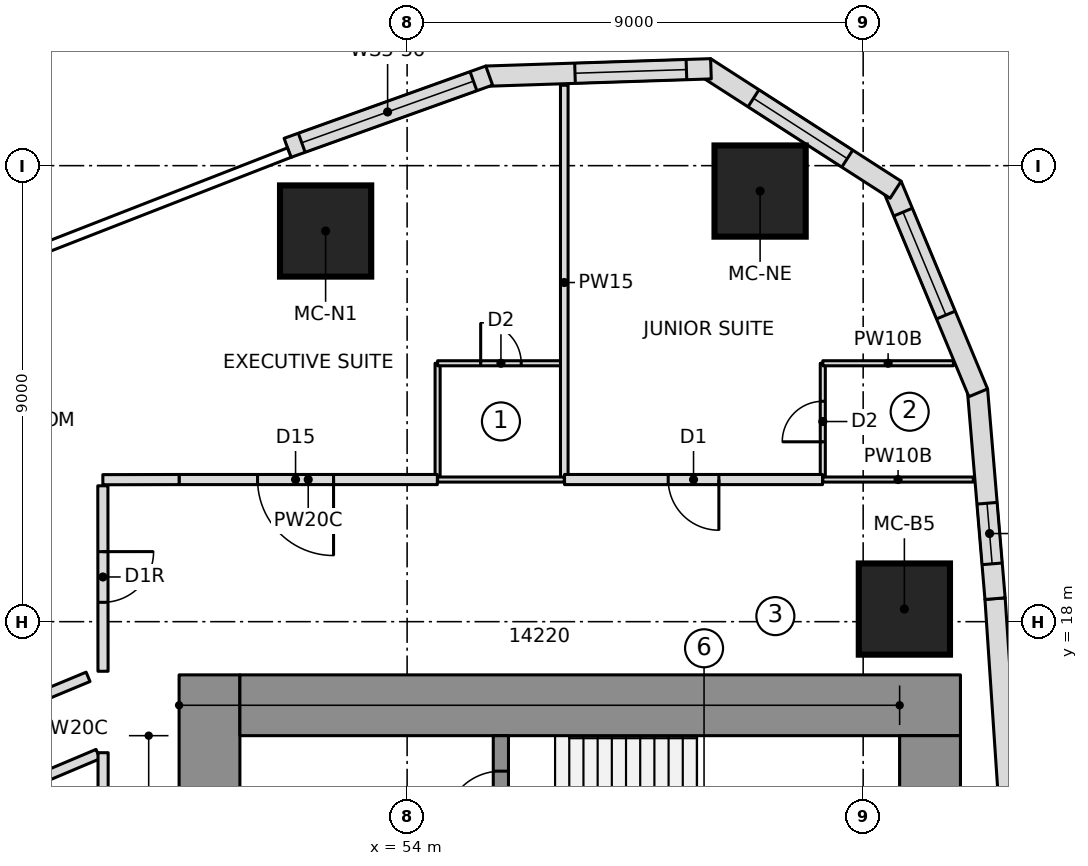
"""IFC4 building model, lengths in metres.
Left out: names, types, materials, properties, quantities, classifications, styles, units other than length and angle.
Written with IfcOpenShell. Run it as: python <this file> out.ifc"""

import sys

from ifc_helpers import new_model, si_unit, direction, frame, frame_2d, origin, origin_2d, place, context, subcontext, project, spatial, polyline, rectangle, outline, extrude, element, fill, save


model = new_model("IFC4")
c1 = context("Model", 3, precision=1e-05, world=origin(), true_north=direction((0.0, 1.0)))
c2 = subcontext(c1, "Body", "Model", "MODEL_VIEW")
j1 = project(units=[si_unit("LENGTHUNIT", "METRE"), si_unit("PLANEANGLEUNIT", "RADIAN")], contexts=[c1])
p1 = place(None, origin())
s1 = spatial("IfcSite", under=j1, at=p1, CompositionType="ELEMENT")
p2 = place(p1, origin())
s2 = spatial("IfcBuilding", under=s1, at=p2, CompositionType="ELEMENT")
p3 = place(p2, frame((0.0, 0.0, 68.0)))
s3 = spatial("IfcBuildingStorey", under=s2, at=p3, CompositionType="ELEMENT", Elevation=68.0)
p4 = place(p3, frame((50.1, 6.65, 0.0), z_axis=(0.0, 0.0, 1.0), x_axis=(0.0, 1.0, 0.0)))
e1 = element("IfcWall", 1, at=p4, inside=s3, PredefinedType="SHEAR", context=c2, shape_type="SweptSolid", body=[
    extrude(rectangle(XDim=10.3, YDim=1.2, at=frame_2d((5.15, 0.0))), origin(), (0.0, 0.0, 1.0), 3.55),
])
p5 = place(p4, frame((6.5, 0.0, 0.0)))
e2 = element("IfcOpeningElement", 2, at=p5, cuts=e1, PredefinedType="OPENING", context=c2, shape_type="SweptSolid", body=[
    extrude(rectangle(XDim=1.1, YDim=2.1, at=frame_2d((0.55, 1.05))), frame((0.0, 0.61, 0.0), z_axis=(0.0, -1.0, 0.0), x_axis=(1.0, 0.0, 0.0)), (0.0, 0.0, 1.0), 1.22),
])
p6 = place(p3, frame((50.7, 16.35, 0.0), z_axis=(0.0, 0.0, 1.0), x_axis=(1.0, 0.0, 0.0)))
e3 = element("IfcWall", 3, at=p6, inside=s3, PredefinedType="SHEAR", context=c2, shape_type="SweptSolid", body=[
    extrude(rectangle(XDim=14.22, YDim=1.2, at=frame_2d((7.11, 0.0))), origin(), (0.0, 0.0, 1.0), 3.55),
])
p7 = place(p3, frame((64.32, 9.95, 0.0), z_axis=(0.0, 0.0, 1.0), x_axis=(0.0, 1.0, 0.0)))
e4 = element("IfcWall", 4, at=p7, inside=s3, PredefinedType="SHEAR", context=c2, shape_type="SweptSolid", body=[
    extrude(rectangle(XDim=5.8, YDim=1.2, at=frame_2d((2.9, 0.0))), origin(), (0.0, 0.0, 1.0), 3.55),
])
p8 = place(p3, frame((55.85, 10.35, 0.0), z_axis=(0.0, 0.0, 1.0), x_axis=(0.0, 1.0, 0.0)))
e5 = element("IfcWall", 5, at=p8, inside=s3, PredefinedType="SHEAR", context=c2, shape_type="SweptSolid", body=[
    extrude(rectangle(XDim=5.4, YDim=0.3, at=frame_2d((2.7, 0.0))), origin(), (0.0, 0.0, 1.0), 3.55),
])
p9 = place(p8, frame((1.43, 0.0, 0.0)))
e6 = element("IfcOpeningElement", 6, at=p9, cuts=e5, PredefinedType="OPENING", context=c2, shape_type="SweptSolid", body=[
    extrude(rectangle(XDim=1.1, YDim=2.1, at=frame_2d((0.55, 1.05))), frame((0.0, 0.16, 0.0), z_axis=(0.0, -1.0, 0.0), x_axis=(1.0, 0.0, 0.0)), (0.0, 0.0, 1.0), 0.32),
])
p10 = place(p8, frame((3.6, 0.0, 0.0)))
e7 = element("IfcOpeningElement", 7, at=p10, cuts=e5, PredefinedType="OPENING", context=c2, shape_type="SweptSolid", body=[
    extrude(rectangle(XDim=1.1, YDim=2.1, at=frame_2d((0.55, 1.05))), frame((0.0, 0.16, 0.0), z_axis=(0.0, -1.0, 0.0), x_axis=(1.0, 0.0, 0.0)), (0.0, 0.0, 1.0), 0.32),
])
for number, where, z_axis, x_axis in (
    (8, (63.813, 18.249, 0.0), (0.0, 0.0, 1.0), (1.0, 0.0, 0.0)),
    (9, (60.966, 26.499, 0.0), (0.0, 0.0, 1.0), (1.0, 0.0, 0.0)),
    (10, (52.392, 25.71, 0.0), (0.0, 0.0, 1.0), (1.0, 0.0, 0.0)),
):
    element("IfcColumn", number, at=place(p3, frame(where, z_axis=z_axis, x_axis=x_axis)), inside=s3, PredefinedType="COLUMN", context=c2, shape_type="SweptSolid", body=[
        extrude(rectangle(XDim=1.8, YDim=1.8, at=origin_2d()), origin(), (0.0, 0.0, 1.0), 3.55),
    ])
p11 = place(p3, frame((65.878, 14.36, 0.0), z_axis=(0.0, 0.0, 1.0), x_axis=(-0.067087430225, 0.997747100575, 0.0)))
e11 = element("IfcWall", 11, at=p11, inside=s3, PredefinedType="NOTDEFINED", context=c2, shape_type="SweptSolid", body=[
    extrude(outline(polyline([(-0.002, -0.2), (4.107, -0.2), (4.103, 0.2), (0.002, 0.2), (-0.002, -0.2)])), origin(), (0.0, 0.0, 1.0), 3.25),
])
p12 = place(p3, frame((65.603, 18.455, 0.0), z_axis=(0.0, 0.0, 1.0), x_axis=(-0.083793550906, 0.996483136248, 0.0)))
e12 = element("IfcWall", 12, at=p12, inside=s3, PredefinedType="NOTDEFINED", context=c2, shape_type="SweptSolid", body=[
    extrude(outline(polyline([(-0.002, -0.2), (4.136, -0.2), (4.074, 0.2), (0.002, 0.2), (-0.002, -0.2)])), origin(), (0.0, 0.0, 1.0), 3.25),
])
p13 = place(p12, frame((0.688, 0.0, 0.9)))
e13 = element("IfcOpeningElement", 13, at=p13, cuts=e12, PredefinedType="OPENING", context=c2, shape_type="SweptSolid", body=[
    extrude(rectangle(XDim=1.2, YDim=1.8, at=frame_2d((0.6, 0.9))), frame((0.0, 0.21, 0.0), z_axis=(0.0, -1.0, 0.0), x_axis=(1.0, 0.0, 0.0)), (0.0, 0.0, 1.0), 0.42),
])
p14 = place(p3, frame((65.259, 22.546, 0.0), z_axis=(0.0, 0.0, 1.0), x_axis=(-0.384372042685, 0.923178277908, 0.0)))
e14 = element("IfcWall", 14, at=p14, inside=s3, PredefinedType="NOTDEFINED", context=c2, shape_type="SweptSolid", body=[
    extrude(outline(polyline([(-0.031, -0.2), (4.408, -0.2), (4.283, 0.2), (0.031, 0.2), (-0.031, -0.2)])), origin(), (0.0, 0.0, 1.0), 3.25),
])
p15 = place(p14, frame((1.631, 0.0, 0.6)))
e15 = element("IfcOpeningElement", 15, at=p15, cuts=e14, PredefinedType="OPENING", context=c2, shape_type="SweptSolid", body=[
    extrude(outline(polyline([(0.0, 1.35), (0.084, 1.771), (0.322, 2.128), (0.679, 2.366), (1.1, 2.45), (1.521, 2.366), (1.878, 2.128), (2.116, 1.771), (2.2, 1.35), (2.2, 1.1), (2.116, 0.679), (1.878, 0.322), (1.521, 0.084), (1.1, 0.0), (0.679, 0.084), (0.322, 0.322), (0.084, 0.679), (0.0, 1.1), (0.0, 1.35)])), frame((0.0, 0.21, 0.0), z_axis=(0.0, -1.0, 0.0), x_axis=(1.0, 0.0, 0.0)), (0.0, 0.0, 1.0), 0.42),
])
p16 = place(p3, frame((63.588, 26.558, 0.0), z_axis=(0.0, 0.0, 1.0), x_axis=(-0.840937468718, 0.541132307025, 0.0)))
e16 = element("IfcWall", 16, at=p16, inside=s3, PredefinedType="NOTDEFINED", context=c2, shape_type="SweptSolid", body=[
    extrude(outline(polyline([(-0.062, -0.2), (4.409, -0.2), (4.284, 0.2), (0.062, 0.2), (-0.062, -0.2)])), origin(), (0.0, 0.0, 1.0), 3.25),
])
p17 = place(p16, frame((1.073, 0.0, 0.6)))
e17 = element("IfcOpeningElement", 17, at=p17, cuts=e16, PredefinedType="OPENING", context=c2, shape_type="SweptSolid", body=[
    extrude(outline(polyline([(0.0, 1.35), (0.084, 1.771), (0.322, 2.128), (0.679, 2.366), (1.1, 2.45), (1.521, 2.366), (1.878, 2.128), (2.116, 1.771), (2.2, 1.35), (2.2, 1.1), (2.116, 0.679), (1.878, 0.322), (1.521, 0.084), (1.1, 0.0), (0.679, 0.084), (0.322, 0.322), (0.084, 0.679), (0.0, 1.1), (0.0, 1.35)])), frame((0.0, 0.21, 0.0), z_axis=(0.0, -1.0, 0.0), x_axis=(1.0, 0.0, 0.0)), (0.0, 0.0, 1.0), 0.42),
])
p18 = place(p3, frame((59.934, 28.91, 0.0), z_axis=(0.0, 0.0, 1.0), x_axis=(-0.999463576228, -0.032749958686, 0.0)))
e18 = element("IfcWall", 18, at=p18, inside=s3, PredefinedType="NOTDEFINED", context=c2, shape_type="SweptSolid", body=[
    extrude(outline(polyline([(-0.062, -0.2), (4.378, -0.2), (4.315, 0.2), (0.062, 0.2), (-0.062, -0.2)])), origin(), (0.0, 0.0, 1.0), 3.25),
])
p19 = place(p18, frame((0.422, 0.0, 0.6)))
e19 = element("IfcOpeningElement", 19, at=p19, cuts=e18, PredefinedType="OPENING", context=c2, shape_type="SweptSolid", body=[
    extrude(outline(polyline([(0.0, 1.35), (0.084, 1.771), (0.322, 2.128), (0.679, 2.366), (1.1, 2.45), (1.521, 2.366), (1.878, 2.128), (2.116, 1.771), (2.2, 1.35), (2.2, 1.1), (2.116, 0.679), (1.878, 0.322), (1.521, 0.084), (1.1, 0.0), (0.679, 0.084), (0.322, 0.322), (0.084, 0.679), (0.0, 1.1), (0.0, 1.35)])), frame((0.0, 0.21, 0.0), z_axis=(0.0, -1.0, 0.0), x_axis=(1.0, 0.0, 0.0)), (0.0, 0.0, 1.0), 0.42),
])
p20 = place(p3, frame((55.59, 28.768, 0.0), z_axis=(0.0, 0.0, 1.0), x_axis=(-0.941339752885, -0.337460323057, 0.0)))
e20 = element("IfcWall", 20, at=p20, inside=s3, PredefinedType="NOTDEFINED", context=c2, shape_type="SweptSolid", body=[
    extrude(outline(polyline([(-0.031, -0.2), (4.196, -0.2), (4.196, 0.2), (0.031, 0.2), (-0.031, -0.2)])), origin(), (0.0, 0.0, 1.0), 3.25),
])
p21 = place(p20, frame((0.298, 0.0, 0.9)))
e21 = element("IfcOpeningElement", 21, at=p21, cuts=e20, PredefinedType="OPENING", context=c2, shape_type="SweptSolid", body=[
    extrude(rectangle(XDim=3.6, YDim=1.8, at=frame_2d((1.8, 0.9))), frame((0.0, 0.21, 0.0), z_axis=(0.0, -1.0, 0.0), x_axis=(1.0, 0.0, 0.0)), (0.0, 0.0, 1.0), 0.42),
])
p22 = place(p3, frame((54.602, 20.8, 0.0), z_axis=(0.0, 0.0, 1.0), x_axis=(0.0, 1.0, 0.0)))
e22 = element("IfcWall", 22, at=p22, inside=s3, PredefinedType="PARTITIONING", context=c2, shape_type="SweptSolid", body=[
    extrude(rectangle(XDim=2.3, YDim=0.1, at=frame_2d((1.15, 0.0))), origin(), (0.0, 0.0, 1.0), 3.25),
])
p23 = place(p3, frame((54.602, 23.1, 0.0), z_axis=(0.0, 0.0, 1.0), x_axis=(1.0, 0.0, 0.0)))
e23 = element("IfcWall", 23, at=p23, inside=s3, PredefinedType="PARTITIONING", context=c2, shape_type="SweptSolid", body=[
    extrude(rectangle(XDim=2.5, YDim=0.1, at=frame_2d((1.25, 0.0))), origin(), (0.0, 0.0, 1.0), 3.25),
])
p24 = place(p23, frame((0.85, 0.0, 0.0)))
e24 = element("IfcOpeningElement", 24, at=p24, cuts=e23, PredefinedType="OPENING", context=c2, shape_type="SweptSolid", body=[
    extrude(rectangle(XDim=0.8, YDim=2.1, at=frame_2d((0.4, 1.05))), frame((0.0, 0.06, 0.0), z_axis=(0.0, -1.0, 0.0), x_axis=(1.0, 0.0, 0.0)), (0.0, 0.0, 1.0), 0.12),
])
p25 = place(p3, frame((62.203, 20.8, 0.0), z_axis=(0.0, 0.0, 1.0), x_axis=(0.0, 1.0, 0.0)))
e25 = element("IfcWall", 25, at=p25, inside=s3, PredefinedType="PARTITIONING", context=c2, shape_type="SweptSolid", body=[
    extrude(rectangle(XDim=2.3, YDim=0.1, at=frame_2d((1.15, 0.0))), origin(), (0.0, 0.0, 1.0), 3.25),
])
p26 = place(p25, frame((0.75, 0.0, 0.0)))
e26 = element("IfcOpeningElement", 26, at=p26, cuts=e25, PredefinedType="OPENING", context=c2, shape_type="SweptSolid", body=[
    extrude(rectangle(XDim=0.8, YDim=2.1, at=frame_2d((0.4, 1.05))), frame((0.0, 0.06, 0.0), z_axis=(0.0, -1.0, 0.0), x_axis=(1.0, 0.0, 0.0)), (0.0, 0.0, 1.0), 0.12),
])
p27 = place(p3, frame((62.203, 23.1, 0.0), z_axis=(0.0, 0.0, 1.0), x_axis=(1.0, 0.0, 0.0)))
e27 = element("IfcWall", 27, at=p27, inside=s3, PredefinedType="PARTITIONING", context=c2, shape_type="SweptSolid", body=[
    extrude(rectangle(XDim=2.578, YDim=0.1, at=frame_2d((1.289, 0.0))), origin(), (0.0, 0.0, 1.0), 3.25),
])
p28 = place(p3, frame((57.102, 20.8, 0.0), z_axis=(0.0, 0.0, 1.0), x_axis=(0.0, 1.0, 0.0)))
e28 = element("IfcWall", 28, at=p28, inside=s3, PredefinedType="PARTITIONING", context=c2, shape_type="SweptSolid", body=[
    extrude(rectangle(XDim=7.787, YDim=0.15, at=frame_2d((3.894, 0.0))), origin(), (0.0, 0.0, 1.0), 3.25),
])
p29 = place(p3, frame((43.85, 13.677, 0.0), z_axis=(0.0, 0.0, 1.0), x_axis=(0.921265924084, 0.388933281068, 0.0)))
e29 = element("IfcWall", 29, at=p29, inside=s3, PredefinedType="PARTITIONING", context=c2, shape_type="SweptSolid", body=[
    extrude(rectangle(XDim=4.396, YDim=0.2, at=frame_2d((2.198, 0.0))), origin(), (0.0, 0.0, 1.0), 3.25),
])
p30 = place(p29, frame((1.508, 0.0, 0.0)))
e30 = element("IfcOpeningElement", 30, at=p30, cuts=e29, PredefinedType="OPENING", context=c2, shape_type="SweptSolid", body=[
    extrude(rectangle(XDim=1.5, YDim=2.1, at=frame_2d((0.75, 1.05))), frame((0.0, 0.11, 0.0), z_axis=(0.0, -1.0, 0.0), x_axis=(1.0, 0.0, 0.0)), (0.0, 0.0, 1.0), 0.22),
])
p31 = place(p3, frame((54.597, 20.805, 0.0), z_axis=(0.0, 0.0, 1.0), x_axis=(-1.0, 0.0, 0.0)))
e31 = element("IfcWall", 31, at=p31, inside=s3, PredefinedType="PARTITIONING", context=c2, shape_type="SweptSolid", body=[
    extrude(rectangle(XDim=5.097, YDim=0.2, at=frame_2d((2.548, 0.0))), origin(), (0.0, 0.0, 1.0), 3.25),
])
p32 = place(p31, frame((2.048, 0.0, 0.0)))
e32 = element("IfcOpeningElement", 32, at=p32, cuts=e31, PredefinedType="OPENING", context=c2, shape_type="SweptSolid", body=[
    extrude(rectangle(XDim=1.5, YDim=2.1, at=frame_2d((0.75, 1.05))), frame((0.0, 0.11, 0.0), z_axis=(0.0, -1.0, 0.0), x_axis=(1.0, 0.0, 0.0)), (0.0, 0.0, 1.0), 0.22),
])
p33 = place(p3, frame((62.198, 20.805, 0.0), z_axis=(0.0, 0.0, 1.0), x_axis=(-1.0, 0.0, 0.0)))
e33 = element("IfcWall", 33, at=p33, inside=s3, PredefinedType="PARTITIONING", context=c2, shape_type="SweptSolid", body=[
    extrude(rectangle(XDim=5.092, YDim=0.2, at=frame_2d((2.546, 0.0))), origin(), (0.0, 0.0, 1.0), 3.25),
])
p34 = place(p33, frame((2.046, 0.0, 0.0)))
e34 = element("IfcOpeningElement", 34, at=p34, cuts=e33, PredefinedType="OPENING", context=c2, shape_type="SweptSolid", body=[
    extrude(rectangle(XDim=1.0, YDim=2.1, at=frame_2d((0.5, 1.05))), frame((0.0, 0.11, 0.0), z_axis=(0.0, -1.0, 0.0), x_axis=(1.0, 0.0, 0.0)), (0.0, 0.0, 1.0), 0.22),
])
p35 = place(p3, frame((57.102, 20.805, 0.0), z_axis=(0.0, 0.0, 1.0), x_axis=(-1.0, 0.0, 0.0)))
e35 = element("IfcWall", 35, at=p35, inside=s3, PredefinedType="PARTITIONING", context=c2, shape_type="SweptSolid", body=[
    extrude(rectangle(XDim=2.5, YDim=0.1, at=frame_2d((1.25, 0.0))), origin(), (0.0, 0.0, 1.0), 3.25),
])
p36 = place(p3, frame((65.175, 20.805, 0.0), z_axis=(0.0, 0.0, 1.0), x_axis=(-1.0, 0.0, 0.0)))
e36 = element("IfcWall", 36, at=p36, inside=s3, PredefinedType="PARTITIONING", context=c2, shape_type="SweptSolid", body=[
    extrude(rectangle(XDim=2.971, YDim=0.1, at=frame_2d((1.486, 0.0))), origin(), (0.0, 0.0, 1.0), 3.25),
])
p37 = place(p3, frame((47.704, 16.911, 0.0), z_axis=(0.0, 0.0, 1.0), x_axis=(-0.923461497361, -0.383691103484, 0.0)))
e37 = element("IfcWall", 37, at=p37, inside=s3, PredefinedType="PARTITIONING", context=c2, shape_type="SweptSolid", body=[
    extrude(rectangle(XDim=5.328, YDim=0.2, at=frame_2d((2.664, 0.0))), origin(), (0.0, 0.0, 1.0), 3.25),
])
p38 = place(p3, frame((48.0, 15.414, 0.0), z_axis=(0.0, 0.0, 1.0), x_axis=(0.0, -1.0, 0.0)))
e38 = element("IfcWall", 38, at=p38, inside=s3, PredefinedType="PARTITIONING", context=c2, shape_type="SweptSolid", body=[
    extrude(rectangle(XDim=30.828, YDim=0.2, at=frame_2d((15.414, 0.0))), origin(), (0.0, 0.0, 1.0), 3.25),
])
p39 = place(p3, frame((49.5, 20.805, 0.0), z_axis=(0.0, 0.0, 1.0), x_axis=(-0.999998104399, -0.001947099992, 0.0)))
e39 = element("IfcWall", 39, at=p39, inside=s3, PredefinedType="PARTITIONING", context=c2, shape_type="SweptSolid", body=[
    extrude(rectangle(XDim=1.505, YDim=0.2, at=frame_2d((0.752, 0.0))), origin(), (0.0, 0.0, 1.0), 3.25),
])
p40 = place(p3, frame((47.996, 20.682, 0.0), z_axis=(0.0, 0.0, 1.0), x_axis=(0.000866955326, -0.999999624194, 0.0)))
e40 = element("IfcWall", 40, at=p40, inside=s3, PredefinedType="PARTITIONING", context=c2, shape_type="SweptSolid", body=[
    extrude(rectangle(XDim=3.661, YDim=0.2, at=frame_2d((1.831, 0.0))), origin(), (0.0, 0.0, 1.0), 3.25),
])
p41 = place(p40, frame((1.3, 0.0, 0.0)))
e41 = element("IfcOpeningElement", 41, at=p41, cuts=e40, PredefinedType="OPENING", context=c2, shape_type="SweptSolid", body=[
    extrude(rectangle(XDim=1.0, YDim=2.1, at=frame_2d((0.5, 1.05))), frame((0.0, 0.11, 0.0), z_axis=(0.0, -1.0, 0.0), x_axis=(1.0, 0.0, 0.0)), (0.0, 0.0, 1.0), 0.22),
])
p42 = place(p13, origin())
e42 = element("IfcWindow", 42, at=p42, inside=s3, PartitioningType="SINGLE_PANEL", PredefinedType="WINDOW", context=c2, shape_type="SweptSolid", body=[
    extrude(rectangle(XDim=1.2, YDim=1.8, at=frame_2d((0.6, 0.9))), frame((0.0, 0.17, 0.0), z_axis=(0.0, -1.0, 0.0), x_axis=(1.0, 0.0, 0.0)), (0.0, 0.0, 1.0), 0.06),
])
fill(e13, e42)
p43 = place(p15, origin())
e43 = element("IfcWindow", 43, at=p43, inside=s3, PartitioningType="SINGLE_PANEL", PredefinedType="WINDOW", context=c2, shape_type="SweptSolid", body=[
    extrude(outline(polyline([(0.0, 1.35), (0.084, 1.771), (0.322, 2.128), (0.679, 2.366), (1.1, 2.45), (1.521, 2.366), (1.878, 2.128), (2.116, 1.771), (2.2, 1.35), (2.2, 1.1), (2.116, 0.679), (1.878, 0.322), (1.521, 0.084), (1.1, 0.0), (0.679, 0.084), (0.322, 0.322), (0.084, 0.679), (0.0, 1.1), (0.0, 1.35)])), frame((0.0, 0.17, 0.0), z_axis=(0.0, -1.0, 0.0), x_axis=(1.0, 0.0, 0.0)), (0.0, 0.0, 1.0), 0.06),
])
fill(e15, e43)
p44 = place(p17, origin())
e44 = element("IfcWindow", 44, at=p44, inside=s3, PartitioningType="SINGLE_PANEL", PredefinedType="WINDOW", context=c2, shape_type="SweptSolid", body=[
    extrude(outline(polyline([(0.0, 1.35), (0.084, 1.771), (0.322, 2.128), (0.679, 2.366), (1.1, 2.45), (1.521, 2.366), (1.878, 2.128), (2.116, 1.771), (2.2, 1.35), (2.2, 1.1), (2.116, 0.679), (1.878, 0.322), (1.521, 0.084), (1.1, 0.0), (0.679, 0.084), (0.322, 0.322), (0.084, 0.679), (0.0, 1.1), (0.0, 1.35)])), frame((0.0, 0.17, 0.0), z_axis=(0.0, -1.0, 0.0), x_axis=(1.0, 0.0, 0.0)), (0.0, 0.0, 1.0), 0.06),
])
fill(e17, e44)
p45 = place(p19, origin())
e45 = element("IfcWindow", 45, at=p45, inside=s3, PartitioningType="SINGLE_PANEL", PredefinedType="WINDOW", context=c2, shape_type="SweptSolid", body=[
    extrude(outline(polyline([(0.0, 1.35), (0.084, 1.771), (0.322, 2.128), (0.679, 2.366), (1.1, 2.45), (1.521, 2.366), (1.878, 2.128), (2.116, 1.771), (2.2, 1.35), (2.2, 1.1), (2.116, 0.679), (1.878, 0.322), (1.521, 0.084), (1.1, 0.0), (0.679, 0.084), (0.322, 0.322), (0.084, 0.679), (0.0, 1.1), (0.0, 1.35)])), frame((0.0, 0.17, 0.0), z_axis=(0.0, -1.0, 0.0), x_axis=(1.0, 0.0, 0.0)), (0.0, 0.0, 1.0), 0.06),
])
fill(e19, e45)
p46 = place(p21, origin())
e46 = element("IfcWindow", 46, at=p46, inside=s3, PartitioningType="SINGLE_PANEL", PredefinedType="WINDOW", context=c2, shape_type="SweptSolid", body=[
    extrude(rectangle(XDim=3.6, YDim=1.8, at=frame_2d((1.8, 0.9))), frame((0.0, 0.17, 0.0), z_axis=(0.0, -1.0, 0.0), x_axis=(1.0, 0.0, 0.0)), (0.0, 0.0, 1.0), 0.06),
])
fill(e21, e46)
p47 = place(p24, origin())
e47 = element("IfcDoor", 47, at=p47, inside=s3, OperationType="SINGLE_SWING_LEFT", PredefinedType="DOOR", context=c2, shape_type="SweptSolid", body=[
    extrude(rectangle(XDim=0.8, YDim=2.1, at=frame_2d((0.4, 1.05))), frame((0.0, 0.025, 0.0), z_axis=(0.0, -1.0, 0.0), x_axis=(1.0, 0.0, 0.0)), (0.0, 0.0, 1.0), 0.05),
])
fill(e24, e47)
p48 = place(p26, origin())
e48 = element("IfcDoor", 48, at=p48, inside=s3, OperationType="SINGLE_SWING_LEFT", PredefinedType="DOOR", context=c2, shape_type="SweptSolid", body=[
    extrude(rectangle(XDim=0.8, YDim=2.1, at=frame_2d((0.4, 1.05))), frame((0.0, 0.025, 0.0), z_axis=(0.0, -1.0, 0.0), x_axis=(1.0, 0.0, 0.0)), (0.0, 0.0, 1.0), 0.05),
])
fill(e26, e48)
p49 = place(p32, origin())
e49 = element("IfcDoor", 49, at=p49, inside=s3, OperationType="DOUBLE_DOOR_SINGLE_SWING", PredefinedType="DOOR", context=c2, shape_type="SweptSolid", body=[
    extrude(rectangle(XDim=1.5, YDim=2.1, at=frame_2d((0.75, 1.05))), frame((0.0, 0.025, 0.0), z_axis=(0.0, -1.0, 0.0), x_axis=(1.0, 0.0, 0.0)), (0.0, 0.0, 1.0), 0.05),
])
fill(e32, e49)
p50 = place(p34, origin())
e50 = element("IfcDoor", 50, at=p50, inside=s3, OperationType="SINGLE_SWING_LEFT", PredefinedType="DOOR", context=c2, shape_type="SweptSolid", body=[
    extrude(rectangle(XDim=1.0, YDim=2.1, at=frame_2d((0.5, 1.05))), frame((0.0, 0.025, 0.0), z_axis=(0.0, -1.0, 0.0), x_axis=(1.0, 0.0, 0.0)), (0.0, 0.0, 1.0), 0.05),
])
fill(e34, e50)
p51 = place(p41, origin())
e51 = element("IfcDoor", 51, at=p51, inside=s3, OperationType="SINGLE_SWING_RIGHT", PredefinedType="DOOR", context=c2, shape_type="SweptSolid", body=[
    extrude(rectangle(XDim=1.0, YDim=2.1, at=frame_2d((0.5, 1.05))), frame((0.0, 0.025, 0.0), z_axis=(0.0, -1.0, 0.0), x_axis=(1.0, 0.0, 0.0)), (0.0, 0.0, 1.0), 0.05),
])
fill(e41, e51)
p52 = place(p10, origin())
e52 = element("IfcDoor", 52, at=p52, inside=s3, OperationType="SINGLE_SWING_RIGHT", PredefinedType="DOOR", context=c2, shape_type="SweptSolid", body=[
    extrude(rectangle(XDim=1.1, YDim=2.1, at=frame_2d((0.55, 1.05))), frame((0.0, 0.025, 0.0), z_axis=(0.0, -1.0, 0.0), x_axis=(1.0, 0.0, 0.0)), (0.0, 0.0, 1.0), 0.05),
])
fill(e7, e52)
save(model, sys.argv[1])
